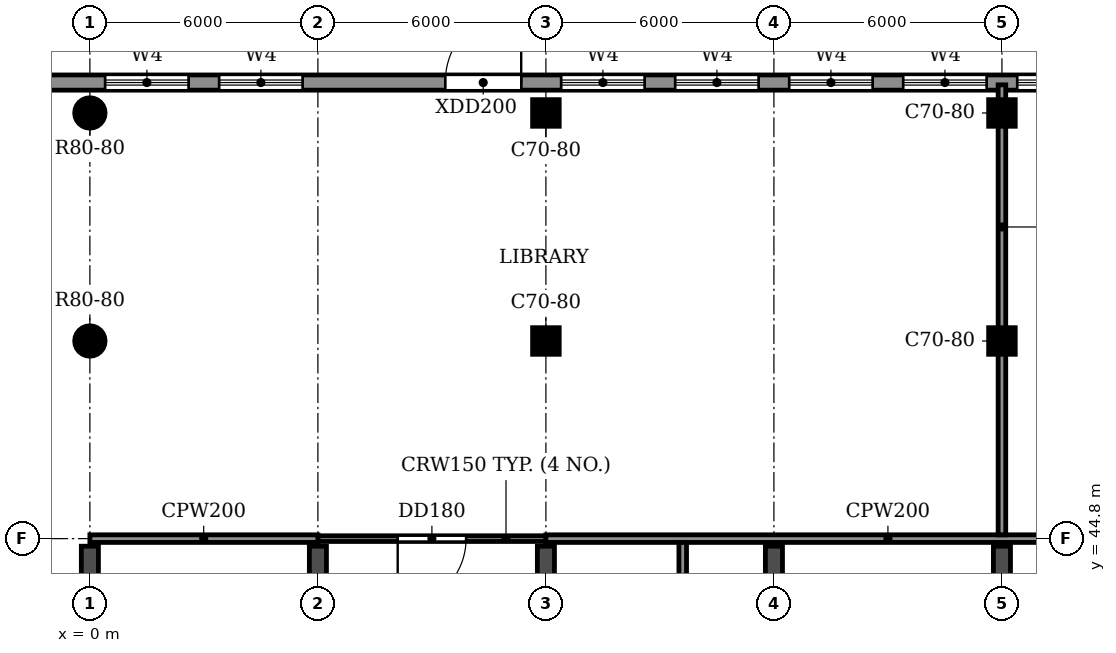
"""IFC4 building model, lengths in metres.
Left out: names, types, materials, properties, quantities, classifications, styles, units other than length and angle.
Written with IfcOpenShell. Run it as: python <this file> out.ifc"""

import sys

from ifc_helpers import new_model, si_unit, direction, frame, frame_2d, origin, origin_2d, place, context, subcontext, project, spatial, rectangle, circle, extrude, source, transform, mapped, element, fill, save


model = new_model("IFC4")
c1 = context("Model", 3, precision=1e-05, world=origin(), true_north=direction((0.0, 1.0)))
c2 = subcontext(c1, "Body", "Model", "MODEL_VIEW")
j1 = project(units=[si_unit("LENGTHUNIT", "METRE"), si_unit("PLANEANGLEUNIT", "RADIAN")], contexts=[c1])
p1 = place(None, origin())
s1 = spatial("IfcSite", under=j1, at=p1, CompositionType="ELEMENT")
p2 = place(p1, origin())
s2 = spatial("IfcBuilding", under=s1, at=p2, CompositionType="ELEMENT")
p3 = place(p2, frame((0.0, 0.0, 15.0)))
s3 = spatial("IfcBuildingStorey", under=s2, at=p3, CompositionType="ELEMENT", Elevation=15.0)
for number, where, z_axis, x_axis in (
    (1, (0.0, 30.55, 0.0), (0.0, 0.0, 1.0), (0.0, 1.0, 0.0)),
    (2, (6.0, 30.55, 0.0), (0.0, 0.0, 1.0), (0.0, 1.0, 0.0)),
    (3, (12.0, 30.55, 0.0), (0.0, 0.0, 1.0), (0.0, 1.0, 0.0)),
    (4, (18.0, 30.55, 0.0), (0.0, 0.0, 1.0), (0.0, 1.0, 0.0)),
    (5, (24.0, 30.55, 0.0), (0.0, 0.0, 1.0), (0.0, 1.0, 0.0)),
):
    element("IfcWall", number, at=place(p3, frame(where, z_axis=z_axis, x_axis=x_axis)), inside=s3, PredefinedType="SHEAR", context=c2, shape_type="SweptSolid", body=[
        extrude(rectangle(XDim=14.05, YDim=0.45, at=frame_2d((7.025, 0.0))), origin(), (0.0, 0.0, 1.0), 3.92),
    ])
m1 = source(origin(), c2, "Body", "SweptSolid", [
    extrude(circle(Radius=0.4, at=origin_2d()), origin(), (0.0, 0.0, 1.0), 3.92),
])
p4 = place(p3, frame((0.0, 56.0, 0.0), z_axis=(0.0, 0.0, 1.0), x_axis=(1.0, 0.0, 0.0)))
e6 = element("IfcColumn", 6, at=p4, inside=s3, PredefinedType="COLUMN", context=c2, shape_type="MappedRepresentation", body=[
    mapped(m1, transform((0.0, 0.0, 0.0))),
])
m2 = source(origin(), c2, "Body", "SweptSolid", [
    extrude(rectangle(XDim=0.7, YDim=0.7, at=origin_2d()), origin(), (0.0, 0.0, 1.0), 3.92),
])
for number, where, z_axis, x_axis in (
    (7, (12.0, 56.0, 0.0), (0.0, 0.0, 1.0), (1.0, 0.0, 0.0)),
    (8, (24.0, 56.0, 0.0), (0.0, 0.0, 1.0), (1.0, 0.0, 0.0)),
):
    element("IfcColumn", number, at=place(p3, frame(where, z_axis=z_axis, x_axis=x_axis)), inside=s3, PredefinedType="COLUMN", context=c2, shape_type="MappedRepresentation", body=[
        mapped(m2, transform((0.0, 0.0, 0.0))),
    ])
p5 = place(p3, frame((0.0, 50.0, 0.0), z_axis=(0.0, 0.0, 1.0), x_axis=(1.0, 0.0, 0.0)))
e9 = element("IfcColumn", 9, at=p5, inside=s3, PredefinedType="COLUMN", context=c2, shape_type="MappedRepresentation", body=[
    mapped(m1, transform((0.0, 0.0, 0.0))),
])
for number, where, z_axis, x_axis in (
    (10, (12.0, 50.0, 0.0), (0.0, 0.0, 1.0), (1.0, 0.0, 0.0)),
    (11, (24.0, 50.0, 0.0), (0.0, 0.0, 1.0), (1.0, 0.0, 0.0)),
):
    element("IfcColumn", number, at=place(p3, frame(where, z_axis=z_axis, x_axis=x_axis)), inside=s3, PredefinedType="COLUMN", context=c2, shape_type="MappedRepresentation", body=[
        mapped(m2, transform((0.0, 0.0, 0.0))),
    ])
p6 = place(p3, frame((105.0, 56.8, 0.0), z_axis=(0.0, 0.0, 1.0), x_axis=(-1.0, 0.0, 0.0)))
e12 = element("IfcWall", 12, at=p6, inside=s3, PredefinedType="STANDARD", context=c2, shape_type="SweptSolid", body=[
    extrude(rectangle(XDim=108.0, YDim=0.4, at=frame_2d((54.0, 0.0))), origin(), (0.0, 0.0, 1.0), 3.92),
])
p7 = place(p6, frame((102.4, 0.0, 0.9)))
e13 = element("IfcOpeningElement", 13, at=p7, cuts=e12, PredefinedType="OPENING", context=c2, shape_type="SweptSolid", body=[
    extrude(rectangle(XDim=2.2, YDim=2.7, at=frame_2d((1.1, 1.35))), frame((0.0, 0.21, 0.0), z_axis=(0.0, -1.0, 0.0), x_axis=(1.0, 0.0, 0.0)), (0.0, 0.0, 1.0), 0.42),
])
p8 = place(p6, frame((99.4, 0.0, 0.9)))
e14 = element("IfcOpeningElement", 14, at=p8, cuts=e12, PredefinedType="OPENING", context=c2, shape_type="SweptSolid", body=[
    extrude(rectangle(XDim=2.2, YDim=2.7, at=frame_2d((1.1, 1.35))), frame((0.0, 0.21, 0.0), z_axis=(0.0, -1.0, 0.0), x_axis=(1.0, 0.0, 0.0)), (0.0, 0.0, 1.0), 0.42),
])
p9 = place(p6, frame((90.4, 0.0, 0.9)))
e15 = element("IfcOpeningElement", 15, at=p9, cuts=e12, PredefinedType="OPENING", context=c2, shape_type="SweptSolid", body=[
    extrude(rectangle(XDim=2.2, YDim=2.7, at=frame_2d((1.1, 1.35))), frame((0.0, 0.21, 0.0), z_axis=(0.0, -1.0, 0.0), x_axis=(1.0, 0.0, 0.0)), (0.0, 0.0, 1.0), 0.42),
])
p10 = place(p6, frame((87.4, 0.0, 0.9)))
e16 = element("IfcOpeningElement", 16, at=p10, cuts=e12, PredefinedType="OPENING", context=c2, shape_type="SweptSolid", body=[
    extrude(rectangle(XDim=2.2, YDim=2.7, at=frame_2d((1.1, 1.35))), frame((0.0, 0.21, 0.0), z_axis=(0.0, -1.0, 0.0), x_axis=(1.0, 0.0, 0.0)), (0.0, 0.0, 1.0), 0.42),
])
p11 = place(p6, frame((84.4, 0.0, 0.9)))
e17 = element("IfcOpeningElement", 17, at=p11, cuts=e12, PredefinedType="OPENING", context=c2, shape_type="SweptSolid", body=[
    extrude(rectangle(XDim=2.2, YDim=2.7, at=frame_2d((1.1, 1.35))), frame((0.0, 0.21, 0.0), z_axis=(0.0, -1.0, 0.0), x_axis=(1.0, 0.0, 0.0)), (0.0, 0.0, 1.0), 0.42),
])
p12 = place(p6, frame((81.4, 0.0, 0.9)))
e18 = element("IfcOpeningElement", 18, at=p12, cuts=e12, PredefinedType="OPENING", context=c2, shape_type="SweptSolid", body=[
    extrude(rectangle(XDim=2.2, YDim=2.7, at=frame_2d((1.1, 1.35))), frame((0.0, 0.21, 0.0), z_axis=(0.0, -1.0, 0.0), x_axis=(1.0, 0.0, 0.0)), (0.0, 0.0, 1.0), 0.42),
])
p13 = place(p6, frame((78.4, 0.0, 0.9)))
e19 = element("IfcOpeningElement", 19, at=p13, cuts=e12, PredefinedType="OPENING", context=c2, shape_type="SweptSolid", body=[
    extrude(rectangle(XDim=2.2, YDim=2.7, at=frame_2d((1.1, 1.35))), frame((0.0, 0.21, 0.0), z_axis=(0.0, -1.0, 0.0), x_axis=(1.0, 0.0, 0.0)), (0.0, 0.0, 1.0), 0.42),
])
p14 = place(p6, frame((75.4, 0.0, 0.9)))
e20 = element("IfcOpeningElement", 20, at=p14, cuts=e12, PredefinedType="OPENING", context=c2, shape_type="SweptSolid", body=[
    extrude(rectangle(XDim=2.2, YDim=2.7, at=frame_2d((1.1, 1.35))), frame((0.0, 0.21, 0.0), z_axis=(0.0, -1.0, 0.0), x_axis=(1.0, 0.0, 0.0)), (0.0, 0.0, 1.0), 0.42),
])
p15 = place(p6, frame((66.4, 0.0, 0.9)))
e21 = element("IfcOpeningElement", 21, at=p15, cuts=e12, PredefinedType="OPENING", context=c2, shape_type="SweptSolid", body=[
    extrude(rectangle(XDim=2.2, YDim=2.7, at=frame_2d((1.1, 1.35))), frame((0.0, 0.21, 0.0), z_axis=(0.0, -1.0, 0.0), x_axis=(1.0, 0.0, 0.0)), (0.0, 0.0, 1.0), 0.42),
])
p16 = place(p6, frame((63.4, 0.0, 0.9)))
e22 = element("IfcOpeningElement", 22, at=p16, cuts=e12, PredefinedType="OPENING", context=c2, shape_type="SweptSolid", body=[
    extrude(rectangle(XDim=2.2, YDim=2.7, at=frame_2d((1.1, 1.35))), frame((0.0, 0.21, 0.0), z_axis=(0.0, -1.0, 0.0), x_axis=(1.0, 0.0, 0.0)), (0.0, 0.0, 1.0), 0.42),
])
p17 = place(p6, frame((60.4, 0.0, 0.9)))
e23 = element("IfcOpeningElement", 23, at=p17, cuts=e12, PredefinedType="OPENING", context=c2, shape_type="SweptSolid", body=[
    extrude(rectangle(XDim=2.2, YDim=2.7, at=frame_2d((1.1, 1.35))), frame((0.0, 0.21, 0.0), z_axis=(0.0, -1.0, 0.0), x_axis=(1.0, 0.0, 0.0)), (0.0, 0.0, 1.0), 0.42),
])
p18 = place(p6, frame((57.4, 0.0, 0.9)))
e24 = element("IfcOpeningElement", 24, at=p18, cuts=e12, PredefinedType="OPENING", context=c2, shape_type="SweptSolid", body=[
    extrude(rectangle(XDim=2.2, YDim=2.7, at=frame_2d((1.1, 1.35))), frame((0.0, 0.21, 0.0), z_axis=(0.0, -1.0, 0.0), x_axis=(1.0, 0.0, 0.0)), (0.0, 0.0, 1.0), 0.42),
])
p19 = place(p6, frame((54.4, 0.0, 0.9)))
e25 = element("IfcOpeningElement", 25, at=p19, cuts=e12, PredefinedType="OPENING", context=c2, shape_type="SweptSolid", body=[
    extrude(rectangle(XDim=2.2, YDim=2.7, at=frame_2d((1.1, 1.35))), frame((0.0, 0.21, 0.0), z_axis=(0.0, -1.0, 0.0), x_axis=(1.0, 0.0, 0.0)), (0.0, 0.0, 1.0), 0.42),
])
p20 = place(p6, frame((51.4, 0.0, 0.9)))
e26 = element("IfcOpeningElement", 26, at=p20, cuts=e12, PredefinedType="OPENING", context=c2, shape_type="SweptSolid", body=[
    extrude(rectangle(XDim=2.2, YDim=2.7, at=frame_2d((1.1, 1.35))), frame((0.0, 0.21, 0.0), z_axis=(0.0, -1.0, 0.0), x_axis=(1.0, 0.0, 0.0)), (0.0, 0.0, 1.0), 0.42),
])
p21 = place(p6, frame((48.4, 0.0, 0.9)))
e27 = element("IfcOpeningElement", 27, at=p21, cuts=e12, PredefinedType="OPENING", context=c2, shape_type="SweptSolid", body=[
    extrude(rectangle(XDim=2.2, YDim=2.7, at=frame_2d((1.1, 1.35))), frame((0.0, 0.21, 0.0), z_axis=(0.0, -1.0, 0.0), x_axis=(1.0, 0.0, 0.0)), (0.0, 0.0, 1.0), 0.42),
])
p22 = place(p6, frame((45.4, 0.0, 0.9)))
e28 = element("IfcOpeningElement", 28, at=p22, cuts=e12, PredefinedType="OPENING", context=c2, shape_type="SweptSolid", body=[
    extrude(rectangle(XDim=2.2, YDim=2.7, at=frame_2d((1.1, 1.35))), frame((0.0, 0.21, 0.0), z_axis=(0.0, -1.0, 0.0), x_axis=(1.0, 0.0, 0.0)), (0.0, 0.0, 1.0), 0.42),
])
p23 = place(p6, frame((42.4, 0.0, 0.9)))
e29 = element("IfcOpeningElement", 29, at=p23, cuts=e12, PredefinedType="OPENING", context=c2, shape_type="SweptSolid", body=[
    extrude(rectangle(XDim=2.2, YDim=2.7, at=frame_2d((1.1, 1.35))), frame((0.0, 0.21, 0.0), z_axis=(0.0, -1.0, 0.0), x_axis=(1.0, 0.0, 0.0)), (0.0, 0.0, 1.0), 0.42),
])
p24 = place(p6, frame((39.4, 0.0, 0.9)))
e30 = element("IfcOpeningElement", 30, at=p24, cuts=e12, PredefinedType="OPENING", context=c2, shape_type="SweptSolid", body=[
    extrude(rectangle(XDim=2.2, YDim=2.7, at=frame_2d((1.1, 1.35))), frame((0.0, 0.21, 0.0), z_axis=(0.0, -1.0, 0.0), x_axis=(1.0, 0.0, 0.0)), (0.0, 0.0, 1.0), 0.42),
])
p25 = place(p6, frame((36.4, 0.0, 0.9)))
e31 = element("IfcOpeningElement", 31, at=p25, cuts=e12, PredefinedType="OPENING", context=c2, shape_type="SweptSolid", body=[
    extrude(rectangle(XDim=2.2, YDim=2.7, at=frame_2d((1.1, 1.35))), frame((0.0, 0.21, 0.0), z_axis=(0.0, -1.0, 0.0), x_axis=(1.0, 0.0, 0.0)), (0.0, 0.0, 1.0), 0.42),
])
p26 = place(p6, frame((33.4, 0.0, 0.9)))
e32 = element("IfcOpeningElement", 32, at=p26, cuts=e12, PredefinedType="OPENING", context=c2, shape_type="SweptSolid", body=[
    extrude(rectangle(XDim=2.2, YDim=2.7, at=frame_2d((1.1, 1.35))), frame((0.0, 0.21, 0.0), z_axis=(0.0, -1.0, 0.0), x_axis=(1.0, 0.0, 0.0)), (0.0, 0.0, 1.0), 0.42),
])
p27 = place(p6, frame((93.65, 0.0, 0.0)))
e33 = element("IfcOpeningElement", 33, at=p27, cuts=e12, PredefinedType="OPENING", context=c2, shape_type="SweptSolid", body=[
    extrude(rectangle(XDim=2.0, YDim=2.4, at=frame_2d((1.0, 1.2))), frame((0.0, 0.21, 0.0), z_axis=(0.0, -1.0, 0.0), x_axis=(1.0, 0.0, 0.0)), (0.0, 0.0, 1.0), 0.42),
])
p28 = place(p6, frame((69.8, 0.0, 0.0)))
e34 = element("IfcOpeningElement", 34, at=p28, cuts=e12, PredefinedType="OPENING", context=c2, shape_type="SweptSolid", body=[
    extrude(rectangle(XDim=2.0, YDim=2.4, at=frame_2d((1.0, 1.2))), frame((0.0, 0.21, 0.0), z_axis=(0.0, -1.0, 0.0), x_axis=(1.0, 0.0, 0.0)), (0.0, 0.0, 1.0), 0.42),
])
p29 = place(p3, frame((6.0, 44.8, 0.0), z_axis=(0.0, 0.0, 1.0), x_axis=(1.0, 0.0, 0.0)))
e35 = element("IfcWall", 35, at=p29, inside=s3, PredefinedType="PARTITIONING", context=c2, shape_type="SweptSolid", body=[
    extrude(rectangle(XDim=6.0, YDim=0.15, at=frame_2d((3.0, 0.0))), origin(), (0.0, 0.0, 1.0), 3.92),
])
p30 = place(p29, frame((2.1, 0.0, 0.0)))
e36 = element("IfcOpeningElement", 36, at=p30, cuts=e35, PredefinedType="OPENING", context=c2, shape_type="SweptSolid", body=[
    extrude(rectangle(XDim=1.8, YDim=2.1, at=frame_2d((0.9, 1.05))), frame((0.0, 0.085, 0.0), z_axis=(0.0, -1.0, 0.0), x_axis=(1.0, 0.0, 0.0)), (0.0, 0.0, 1.0), 0.17),
])
p31 = place(p3, frame((0.0, 44.8, 0.0), z_axis=(0.0, 0.0, 1.0), x_axis=(1.0, 0.0, 0.0)))
e37 = element("IfcWall", 37, at=p31, inside=s3, PredefinedType="PARTITIONING", context=c2, shape_type="SweptSolid", body=[
    extrude(rectangle(XDim=6.0, YDim=0.2, at=frame_2d((3.0, 0.0))), origin(), (0.0, 0.0, 1.0), 3.92),
])
p32 = place(p3, frame((12.0, 44.8, 0.0), z_axis=(0.0, 0.0, 1.0), x_axis=(1.0, 0.0, 0.0)))
e38 = element("IfcWall", 38, at=p32, inside=s3, PredefinedType="PARTITIONING", context=c2, shape_type="SweptSolid", body=[
    extrude(rectangle(XDim=18.0, YDim=0.2, at=frame_2d((9.0, 0.0))), origin(), (0.0, 0.0, 1.0), 3.92),
])
p33 = place(p3, frame((15.6, 32.875, 0.0), z_axis=(0.0, 0.0, 1.0), x_axis=(0.0, 1.0, 0.0)))
e39 = element("IfcWall", 39, at=p33, inside=s3, PredefinedType="PARTITIONING", context=c2, shape_type="SweptSolid", body=[
    extrude(rectangle(XDim=11.825, YDim=0.2, at=frame_2d((5.913, 0.0))), origin(), (0.0, 0.0, 1.0), 3.92),
])
p34 = place(p3, frame((24.0, 44.9, 0.0), z_axis=(0.0, 0.0, 1.0), x_axis=(0.0, 1.0, 0.0)))
e40 = element("IfcWall", 40, at=p34, inside=s3, PredefinedType="PARTITIONING", context=c2, shape_type="SweptSolid", body=[
    extrude(rectangle(XDim=11.84, YDim=0.2, at=frame_2d((5.92, 0.0))), origin(), (0.0, 0.0, 1.0), 3.92),
])
p35 = place(p7, origin())
e41 = element("IfcWindow", 41, at=p35, inside=s3, PartitioningType="DOUBLE_PANEL_HORIZONTAL", PredefinedType="WINDOW", context=c2, shape_type="SweptSolid", body=[
    extrude(rectangle(XDim=2.2, YDim=2.7, at=frame_2d((1.1, 1.35))), frame((0.0, 0.03, 0.0), z_axis=(0.0, -1.0, 0.0), x_axis=(1.0, 0.0, 0.0)), (0.0, 0.0, 1.0), 0.06),
])
fill(e13, e41)
p36 = place(p8, origin())
e42 = element("IfcWindow", 42, at=p36, inside=s3, PartitioningType="DOUBLE_PANEL_HORIZONTAL", PredefinedType="WINDOW", context=c2, shape_type="SweptSolid", body=[
    extrude(rectangle(XDim=2.2, YDim=2.7, at=frame_2d((1.1, 1.35))), frame((0.0, 0.03, 0.0), z_axis=(0.0, -1.0, 0.0), x_axis=(1.0, 0.0, 0.0)), (0.0, 0.0, 1.0), 0.06),
])
fill(e14, e42)
p37 = place(p9, origin())
e43 = element("IfcWindow", 43, at=p37, inside=s3, PartitioningType="DOUBLE_PANEL_HORIZONTAL", PredefinedType="WINDOW", context=c2, shape_type="SweptSolid", body=[
    extrude(rectangle(XDim=2.2, YDim=2.7, at=frame_2d((1.1, 1.35))), frame((0.0, 0.03, 0.0), z_axis=(0.0, -1.0, 0.0), x_axis=(1.0, 0.0, 0.0)), (0.0, 0.0, 1.0), 0.06),
])
fill(e15, e43)
p38 = place(p10, origin())
e44 = element("IfcWindow", 44, at=p38, inside=s3, PartitioningType="DOUBLE_PANEL_HORIZONTAL", PredefinedType="WINDOW", context=c2, shape_type="SweptSolid", body=[
    extrude(rectangle(XDim=2.2, YDim=2.7, at=frame_2d((1.1, 1.35))), frame((0.0, 0.03, 0.0), z_axis=(0.0, -1.0, 0.0), x_axis=(1.0, 0.0, 0.0)), (0.0, 0.0, 1.0), 0.06),
])
fill(e16, e44)
p39 = place(p11, origin())
e45 = element("IfcWindow", 45, at=p39, inside=s3, PartitioningType="DOUBLE_PANEL_HORIZONTAL", PredefinedType="WINDOW", context=c2, shape_type="SweptSolid", body=[
    extrude(rectangle(XDim=2.2, YDim=2.7, at=frame_2d((1.1, 1.35))), frame((0.0, 0.03, 0.0), z_axis=(0.0, -1.0, 0.0), x_axis=(1.0, 0.0, 0.0)), (0.0, 0.0, 1.0), 0.06),
])
fill(e17, e45)
p40 = place(p12, origin())
e46 = element("IfcWindow", 46, at=p40, inside=s3, PartitioningType="DOUBLE_PANEL_HORIZONTAL", PredefinedType="WINDOW", context=c2, shape_type="SweptSolid", body=[
    extrude(rectangle(XDim=2.2, YDim=2.7, at=frame_2d((1.1, 1.35))), frame((0.0, 0.03, 0.0), z_axis=(0.0, -1.0, 0.0), x_axis=(1.0, 0.0, 0.0)), (0.0, 0.0, 1.0), 0.06),
])
fill(e18, e46)
p41 = place(p13, origin())
e47 = element("IfcWindow", 47, at=p41, inside=s3, PartitioningType="DOUBLE_PANEL_HORIZONTAL", PredefinedType="WINDOW", context=c2, shape_type="SweptSolid", body=[
    extrude(rectangle(XDim=2.2, YDim=2.7, at=frame_2d((1.1, 1.35))), frame((0.0, 0.03, 0.0), z_axis=(0.0, -1.0, 0.0), x_axis=(1.0, 0.0, 0.0)), (0.0, 0.0, 1.0), 0.06),
])
fill(e19, e47)
p42 = place(p30, frame((1.8, 0.0, 0.0), z_axis=(0.0, 0.0, 1.0), x_axis=(-1.0, 0.0, 0.0)))
e48 = element("IfcDoor", 48, at=p42, inside=s3, OperationType="DOUBLE_DOOR_SINGLE_SWING", PredefinedType="DOOR", context=c2, shape_type="SweptSolid", body=[
    extrude(rectangle(XDim=1.8, YDim=2.1, at=frame_2d((0.9, 1.05))), frame((0.0, 0.025, 0.0), z_axis=(0.0, -1.0, 0.0), x_axis=(1.0, 0.0, 0.0)), (0.0, 0.0, 1.0), 0.05),
])
fill(e36, e48)
p43 = place(p27, frame((2.0, 0.0, 0.0), z_axis=(0.0, 0.0, 1.0), x_axis=(-1.0, 0.0, 0.0)))
e49 = element("IfcDoor", 49, at=p43, inside=s3, OperationType="DOUBLE_DOOR_SINGLE_SWING", PredefinedType="DOOR", context=c2, shape_type="SweptSolid", body=[
    extrude(rectangle(XDim=2.0, YDim=2.4, at=frame_2d((1.0, 1.2))), frame((0.0, 0.025, 0.0), z_axis=(0.0, -1.0, 0.0), x_axis=(1.0, 0.0, 0.0)), (0.0, 0.0, 1.0), 0.05),
])
fill(e33, e49)
save(model, sys.argv[1])
